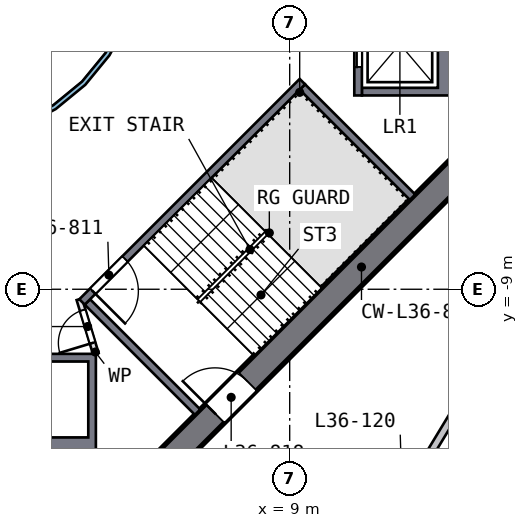
"""IFC4 building model, lengths in metres.
Left out: names, types, materials, properties, quantities, classifications, styles, units other than length and angle.
Written with IfcOpenShell. Run it as: python <this file> out.ifc"""

import sys

from ifc_helpers import new_model, si_unit, direction, frame, frame_2d, origin, place, context, subcontext, project, spatial, polyline, rectangle, outline, extrude, element, fill, save


model = new_model("IFC4")
c1 = context("Model", 3, precision=1e-05, world=origin(), true_north=direction((0.0, 1.0)))
c2 = subcontext(c1, "Body", "Model", "MODEL_VIEW")
j1 = project(units=[si_unit("LENGTHUNIT", "METRE"), si_unit("PLANEANGLEUNIT", "RADIAN")], contexts=[c1])
p1 = place(None, origin())
s1 = spatial("IfcSite", under=j1, at=p1, CompositionType="ELEMENT")
p2 = place(p1, origin())
s2 = spatial("IfcBuilding", under=s1, at=p2, CompositionType="ELEMENT")
p3 = place(p2, frame((0.0, 0.0, 150.5)))
s3 = spatial("IfcBuildingStorey", under=s2, at=p3, CompositionType="ELEMENT", Elevation=150.5)
p4 = place(p3, frame((5.552, -13.752, 0.0), z_axis=(0.0, 0.0, 1.0), x_axis=(0.707106781, 0.707106781, 0.0)))
e1 = element("IfcWall", 1, at=p4, inside=s3, PredefinedType="SHEAR", context=c2, shape_type="SweptSolid", body=[
    extrude(rectangle(XDim=11.598, YDim=0.7, at=frame_2d((5.799, 0.0))), origin(), (0.0, 0.0, 1.0), 3.5),
])
p5 = place(p4, frame((2.099, 0.0, 0.0)))
e2 = element("IfcOpeningElement", 2, at=p5, cuts=e1, PredefinedType="OPENING", context=c2, shape_type="SweptSolid", body=[
    extrude(rectangle(XDim=1.2, YDim=2.1, at=frame_2d((0.6, 1.05))), frame((0.0, 0.36, 0.0), z_axis=(0.0, -1.0, 0.0), x_axis=(1.0, 0.0, 0.0)), (0.0, 0.0, 1.0), 0.72),
])
p6 = place(p3, origin())
e3 = element("IfcWall", 3, at=p6, inside=s3, PredefinedType="SOLIDWALL", context=c2, shape_type="SweptSolid", body=[
    extrude(outline(polyline([(13.3, -3.9), (10.9, -3.9), (10.9, -3.7), (12.9, -3.7), (12.9, -1.4), (10.9, -1.4), (10.9, -1.2), (13.3, -1.2), (13.3, -3.9)])), origin(), (0.0, 0.0, 1.0), 3.19),
])
p7 = place(p3, frame((10.8, -1.2, 0.0), z_axis=(0.0, 0.0, 1.0), x_axis=(0.0, -1.0, 0.0)))
e4 = element("IfcWall", 4, at=p7, inside=s3, PredefinedType="SOLIDWALL", context=c2, shape_type="SweptSolid", body=[
    extrude(rectangle(XDim=2.7, YDim=0.2, at=frame_2d((1.35, 0.0))), origin(), (0.0, 0.0, 1.0), 3.19),
])
p8 = place(p7, frame((0.75, 0.0, 0.0)))
e5 = element("IfcOpeningElement", 5, at=p8, cuts=e4, PredefinedType="OPENING", context=c2, shape_type="SweptSolid", body=[
    extrude(rectangle(XDim=1.2, YDim=2.1, at=frame_2d((0.6, 1.05))), frame((0.0, 0.11, 0.0), z_axis=(0.0, -1.0, 0.0), x_axis=(1.0, 0.0, 0.0)), (0.0, 0.0, 1.0), 0.22),
])
p9 = place(p3, origin())
e6 = element("IfcWall", 6, at=p9, inside=s3, PredefinedType="SOLIDWALL", context=c2, shape_type="SweptSolid", body=[
    extrude(outline(polyline([(3.9, -10.7), (3.9, -13.3), (1.2, -13.3), (1.2, -10.7), (3.9, -10.7)]), holes=[polyline([(1.4, -12.9), (3.7, -12.9), (3.7, -10.9), (1.4, -10.9), (1.4, -12.9)])]), origin(), (0.0, 0.0, 1.0), 3.19),
])
p10 = place(p3, frame((9.334, -3.535, 0.0), z_axis=(0.0, 0.0, 1.0), x_axis=(-0.707106781, -0.707106781, 0.0)))
e7 = element("IfcWall", 7, at=p10, inside=s3, PredefinedType="SOLIDWALL", context=c2, shape_type="SweptSolid", body=[
    extrude(rectangle(XDim=8.2, YDim=0.2, at=frame_2d((4.1, 0.0))), origin(), (0.0, 0.0, 1.0), 3.19),
])
p11 = place(p10, frame((6.6, 0.0, 0.0)))
e8 = element("IfcOpeningElement", 8, at=p11, cuts=e7, PredefinedType="OPENING", context=c2, shape_type="SweptSolid", body=[
    extrude(rectangle(XDim=1.2, YDim=2.1, at=frame_2d((0.6, 1.05))), frame((0.0, 0.11, 0.0), z_axis=(0.0, -1.0, 0.0), x_axis=(1.0, 0.0, 0.0)), (0.0, 0.0, 1.0), 0.22),
])
for number, where, z_axis, x_axis in (
    (9, (3.677, -9.334, 0.0), (0.0, 0.0, 1.0), (0.707, -0.707, 0.0)),
    (10, (9.334, -3.677, 0.0), (0.0, 0.0, 1.0), (0.707, -0.707, 0.0)),
):
    element("IfcWall", number, at=place(p3, frame(where, z_axis=z_axis, x_axis=x_axis)), inside=s3, PredefinedType="SOLIDWALL", context=c2, shape_type="SweptSolid", body=[
        extrude(rectangle(XDim=4.1, YDim=0.2, at=frame_2d((2.05, 0.0))), origin(), (0.0, 0.0, 1.0), 3.19),
    ])
p12 = place(p3, frame((3.9, -10.7, 0.0), z_axis=(0.0, 0.0, 1.0), x_axis=(-0.289808785, 0.957084567, 0.0)))
e11 = element("IfcWall", 11, at=p12, inside=s3, PredefinedType="PARTITIONING", context=c2, shape_type="SweptSolid", body=[
    extrude(rectangle(XDim=1.501, YDim=0.15, at=frame_2d((0.75, 0.0))), origin(), (0.0, 0.0, 1.0), 3.19),
])
p13 = place(p12, frame((0.301, 0.0, 0.0)))
e12 = element("IfcOpeningElement", 12, at=p13, cuts=e11, PredefinedType="OPENING", context=c2, shape_type="SweptSolid", body=[
    extrude(rectangle(XDim=0.9, YDim=2.1, at=frame_2d((0.45, 1.05))), frame((0.0, 0.085, 0.0), z_axis=(0.0, -1.0, 0.0), x_axis=(1.0, 0.0, 0.0)), (0.0, 0.0, 1.0), 0.17),
])
p14 = place(p3, origin())
e13 = element("IfcWall", 13, at=p14, inside=s3, PredefinedType="SOLIDWALL", context=c2, shape_type="SweptSolid", body=[
    extrude(outline(polyline([(5.021, -0.999), (4.73, -1.959), (4.257, -2.844), (3.62, -3.62), (2.844, -4.257), (1.959, -4.73), (0.999, -5.021), (0.0, -5.12), (-0.999, -5.021), (-1.959, -4.73), (-2.844, -4.257), (-3.62, -3.62), (-4.257, -2.844), (-4.73, -1.959), (-5.021, -0.999), (-5.12, 0.0), (-5.021, 0.999), (-4.73, 1.959), (-4.257, 2.844), (-3.62, 3.62), (-2.844, 4.257), (-1.959, 4.73), (-0.999, 5.021), (0.0, 5.12), (0.999, 5.021), (1.959, 4.73), (2.844, 4.257), (3.62, 3.62), (4.257, 2.844), (4.73, 1.959), (5.021, 0.999), (5.12, 0.0), (5.021, -0.999)]), holes=[polyline([(4.904, 0.976), (4.619, 1.913), (4.157, 2.778), (3.535, 3.535), (2.778, 4.157), (1.913, 4.619), (0.976, 4.904), (0.0, 5.0), (-0.976, 4.904), (-1.913, 4.619), (-2.778, 4.157), (-3.535, 3.535), (-4.157, 2.778), (-4.619, 1.913), (-4.904, 0.976), (-5.0, 0.0), (-4.904, -0.976), (-4.619, -1.913), (-4.157, -2.778), (-3.535, -3.535), (-2.778, -4.157), (-1.913, -4.619), (-0.976, -4.904), (0.0, -5.0), (0.976, -4.904), (1.913, -4.619), (2.778, -4.157), (3.535, -3.535), (4.157, -2.778), (4.619, -1.913), (4.904, -0.976), (5.0, 0.0), (4.904, 0.976)])]), origin(), (0.0, 0.0, 1.0), 3.19),
])
p15 = place(p3, frame((12.725, -13.269, 0.0), z_axis=(0.0, 0.0, 1.0), x_axis=(0.518037864, 0.855357686, 0.0)))
e14 = element("IfcWall", 14, at=p15, inside=s3, PredefinedType="SOLIDWALL", context=c2, shape_type="SweptSolid", body=[
    extrude(rectangle(XDim=9.516, YDim=0.2, at=frame_2d((4.758, 0.0))), origin(), (0.0, 0.0, 1.0), 3.19),
])
p16 = place(p8, origin())
e15 = element("IfcDoor", 15, at=p16, inside=s3, OperationType="DOUBLE_DOOR_SLIDING", PredefinedType="DOOR", context=c2, shape_type="SweptSolid", body=[
    extrude(rectangle(XDim=1.2, YDim=2.1, at=frame_2d((0.6, 1.05))), frame((0.0, 0.025, 0.0), z_axis=(0.0, -1.0, 0.0), x_axis=(1.0, 0.0, 0.0)), (0.0, 0.0, 1.0), 0.05),
])
fill(e5, e15)
p17 = place(p11, origin())
e16 = element("IfcDoor", 16, at=p17, inside=s3, OperationType="SINGLE_SWING_RIGHT", PredefinedType="DOOR", context=c2, shape_type="SweptSolid", body=[
    extrude(rectangle(XDim=1.2, YDim=2.1, at=frame_2d((0.6, 1.05))), frame((0.0, 0.025, 0.0), z_axis=(0.0, -1.0, 0.0), x_axis=(1.0, 0.0, 0.0)), (0.0, 0.0, 1.0), 0.05),
])
fill(e8, e16)
p18 = place(p5, origin())
e17 = element("IfcDoor", 17, at=p18, inside=s3, OperationType="SINGLE_SWING_LEFT", PredefinedType="DOOR", context=c2, shape_type="SweptSolid", body=[
    extrude(rectangle(XDim=1.2, YDim=2.1, at=frame_2d((0.6, 1.05))), frame((0.0, 0.025, 0.0), z_axis=(0.0, -1.0, 0.0), x_axis=(1.0, 0.0, 0.0)), (0.0, 0.0, 1.0), 0.05),
])
fill(e2, e17)
p19 = place(p13, origin())
e18 = element("IfcDoor", 18, at=p19, inside=s3, OperationType="SINGLE_SWING_LEFT", PredefinedType="DOOR", context=c2, shape_type="SweptSolid", body=[
    extrude(rectangle(XDim=0.9, YDim=2.1, at=frame_2d((0.45, 1.05))), frame((0.0, 0.025, 0.0), z_axis=(0.0, -1.0, 0.0), x_axis=(1.0, 0.0, 0.0)), (0.0, 0.0, 1.0), 0.05),
])
fill(e12, e18)
save(model, sys.argv[1])
